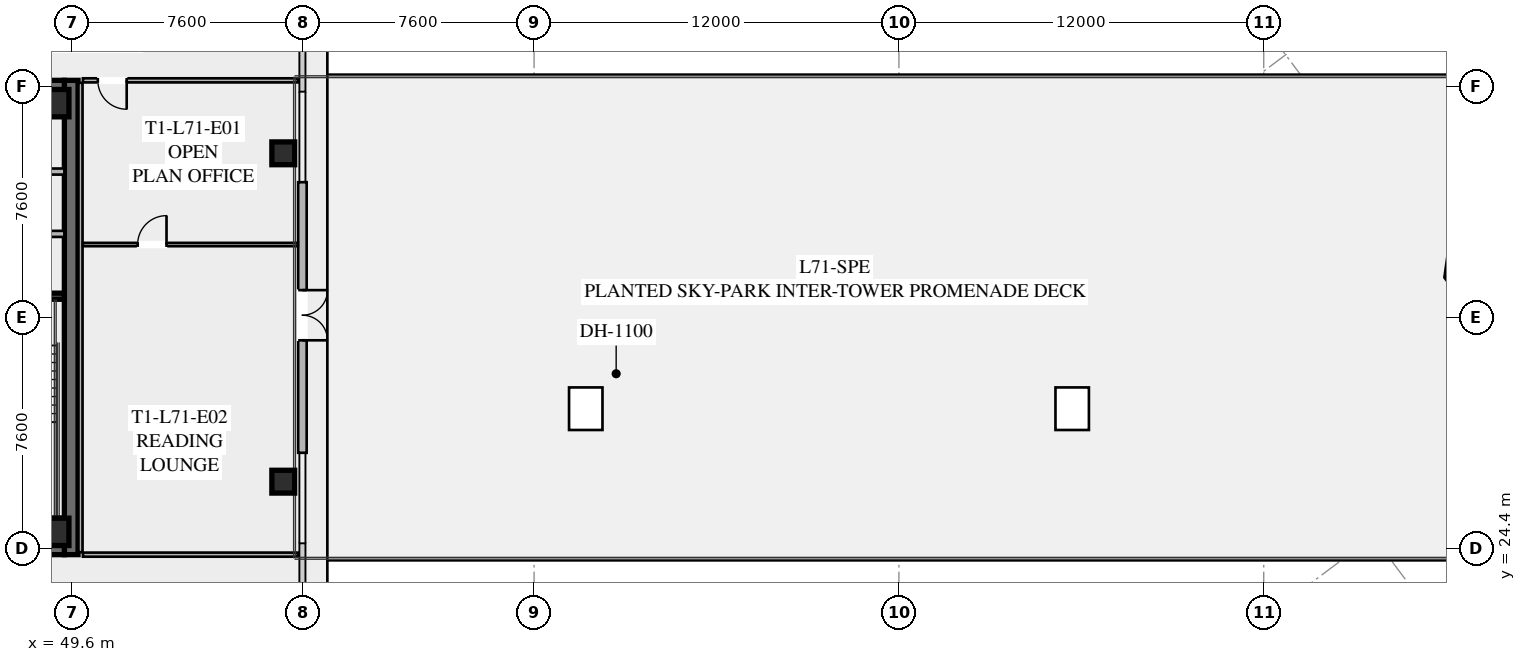
"""IFC4 building model, lengths in metres.
Left out: names, types, materials, properties, quantities, classifications, styles, units other than length and angle.
Written with IfcOpenShell. Run it as: python <this file> out.ifc"""

import sys

from ifc_helpers import new_model, si_unit, direction, frame, frame_2d, origin, origin_2d, place, context, subcontext, project, spatial, rectangle, hollow_rectangle, extrude, element, fill, save


model = new_model("IFC4")
c1 = context("Model", 3, precision=1e-05, world=origin(), true_north=direction((0.0, 1.0)))
c2 = subcontext(c1, "Body", "Model", "MODEL_VIEW")
j1 = project(units=[si_unit("LENGTHUNIT", "METRE"), si_unit("PLANEANGLEUNIT", "RADIAN")], contexts=[c1])
p1 = place(None, origin())
s1 = spatial("IfcSite", under=j1, at=p1, CompositionType="ELEMENT")
p2 = place(p1, origin())
s2 = spatial("IfcBuilding", under=s1, at=p2, CompositionType="ELEMENT")
p3 = place(p2, frame((0.0, 0.0, 263.4)))
s3 = spatial("IfcBuildingStorey", under=s2, at=p3, CompositionType="ELEMENT", Elevation=263.4)
p4 = place(p3, frame((49.575, 39.8, 0.0), z_axis=(0.0, 0.0, 1.0), x_axis=(0.0, -1.0, 0.0)))
e1 = element("IfcWall", 1, at=p4, inside=s3, PredefinedType="SHEAR", context=c2, shape_type="SweptSolid", body=[
    extrude(rectangle(XDim=15.6, YDim=0.45, at=frame_2d((7.8, 0.0))), origin(), (0.0, 0.0, 1.0), 3.55),
])
p5 = place(p3, frame((49.35, 24.425, 0.0), z_axis=(0.0, 0.0, 1.0), x_axis=(-1.0, 0.0, 0.0)))
e2 = element("IfcWall", 2, at=p5, inside=s3, PredefinedType="SHEAR", context=c2, shape_type="SweptSolid", body=[
    extrude(rectangle(XDim=14.7, YDim=0.45, at=frame_2d((7.35, 0.0))), origin(), (0.0, 0.0, 1.0), 3.55),
])
p6 = place(p5, frame((9.05, 0.0, 0.0)))
e3 = element("IfcOpeningElement", 3, at=p6, cuts=e2, PredefinedType="OPENING", context=c2, shape_type="SweptSolid", body=[
    extrude(rectangle(XDim=1.25, YDim=2.25, at=frame_2d((0.625, 1.125))), frame((0.0, 0.235, 0.0), z_axis=(0.0, -1.0, 0.0), x_axis=(1.0, 0.0, 0.0)), (0.0, 0.0, 1.0), 0.47),
])
p7 = place(p5, frame((4.0, 0.0, 0.0)))
e4 = element("IfcOpeningElement", 4, at=p7, cuts=e2, PredefinedType="OPENING", context=c2, shape_type="SweptSolid", body=[
    extrude(rectangle(XDim=1.25, YDim=2.25, at=frame_2d((0.625, 1.125))), frame((0.0, 0.235, 0.0), z_axis=(0.0, -1.0, 0.0), x_axis=(1.0, 0.0, 0.0)), (0.0, 0.0, 1.0), 0.47),
])
p8 = place(p3, frame((34.65, 39.575, 0.0), z_axis=(0.0, 0.0, 1.0), x_axis=(1.0, 0.0, 0.0)))
e5 = element("IfcWall", 5, at=p8, inside=s3, PredefinedType="SHEAR", context=c2, shape_type="SweptSolid", body=[
    extrude(rectangle(XDim=14.7, YDim=0.45, at=frame_2d((7.35, 0.0))), origin(), (0.0, 0.0, 1.0), 3.55),
])
p9 = place(p8, frame((4.4, 0.0, 0.0)))
e6 = element("IfcOpeningElement", 6, at=p9, cuts=e5, PredefinedType="OPENING", context=c2, shape_type="SweptSolid", body=[
    extrude(rectangle(XDim=1.25, YDim=2.25, at=frame_2d((0.625, 1.125))), frame((0.0, 0.235, 0.0), z_axis=(0.0, -1.0, 0.0), x_axis=(1.0, 0.0, 0.0)), (0.0, 0.0, 1.0), 0.47),
])
p10 = place(p8, frame((9.45, 0.0, 0.0)))
e7 = element("IfcOpeningElement", 7, at=p10, cuts=e5, PredefinedType="OPENING", context=c2, shape_type="SweptSolid", body=[
    extrude(rectangle(XDim=1.25, YDim=2.25, at=frame_2d((0.625, 1.125))), frame((0.0, 0.235, 0.0), z_axis=(0.0, -1.0, 0.0), x_axis=(1.0, 0.0, 0.0)), (0.0, 0.0, 1.0), 0.47),
])
for number, where, z_axis, x_axis in (
    (8, (49.05, 24.95, 0.0), (0.0, 0.0, 1.0), (1.0, 0.0, 0.0)),
    (9, (49.05, 39.05, 0.0), (0.0, 0.0, 1.0), (1.0, 0.0, 0.0)),
):
    element("IfcColumn", number, at=place(p3, frame(where, z_axis=z_axis, x_axis=x_axis)), inside=s3, PredefinedType="COLUMN", context=c2, shape_type="SweptSolid", body=[
        extrude(hollow_rectangle(XDim=0.9, YDim=0.9, WallThickness=0.04, at=origin_2d()), origin(), (0.0, 0.0, 1.0), 3.37),
    ])
for number, where, z_axis, x_axis in (
    (10, (56.55, 26.6, -0.295), (0.0, 0.0, 1.0), (1.0, 0.0, 0.0)),
    (11, (56.55, 37.4, -0.295), (0.0, 0.0, 1.0), (1.0, 0.0, 0.0)),
):
    element("IfcColumn", number, at=place(p3, frame(where, z_axis=z_axis, x_axis=x_axis)), inside=s3, PredefinedType="COLUMN", context=c2, shape_type="SweptSolid", body=[
        extrude(hollow_rectangle(XDim=0.75, YDim=0.75, WallThickness=0.032, at=origin_2d()), origin(), (0.0, 0.0, 1.0), 3.665),
    ])
p11 = place(p3, frame((57.18, 36.45, 0.0), z_axis=(0.0, 0.0, 1.0), x_axis=(0.0, -1.0, 0.0)))
e12 = element("IfcWall", 12, at=p11, inside=s3, PredefinedType="SOLIDWALL", context=c2, shape_type="SweptSolid", body=[
    extrude(rectangle(XDim=8.9, YDim=0.28, at=frame_2d((4.45, 0.0))), origin(), (0.0, 0.0, 1.0), 3.37),
])
p12 = place(p11, frame((3.55, 0.0, 0.0)))
e13 = element("IfcOpeningElement", 13, at=p12, cuts=e12, PredefinedType="OPENING", context=c2, shape_type="SweptSolid", body=[
    extrude(rectangle(XDim=1.65, YDim=2.2, at=frame_2d((0.825, 1.1))), frame((0.0, 0.15, 0.0), z_axis=(0.0, -1.0, 0.0), x_axis=(1.0, 0.0, 0.0)), (0.0, 0.0, 1.0), 0.3),
])
for number, where, z_axis, x_axis in (
    (14, (45.7, 32.7, 0.0), (0.0, 0.0, 1.0), (1.0, 0.0, 0.0)),
    (15, (45.7, 25.3, 0.0), (0.0, 0.0, 1.0), (1.0, 0.0, 0.0)),
):
    element("IfcWall", number, at=place(p3, frame(where, z_axis=z_axis, x_axis=x_axis)), inside=s3, PredefinedType="SHEAR", context=c2, shape_type="SweptSolid", body=[
        extrude(rectangle(XDim=3.65, YDim=0.2, at=frame_2d((1.825, 0.0))), origin(), (0.0, 0.0, 1.0), 3.37),
    ])
for number, where, z_axis, x_axis in (
    (16, (46.05, 34.75, 0.0), (0.0, 0.0, 1.0), (1.0, 0.0, 0.0)),
    (17, (46.05, 36.8, 0.0), (0.0, 0.0, 1.0), (1.0, 0.0, 0.0)),
):
    element("IfcWall", number, at=place(p3, frame(where, z_axis=z_axis, x_axis=x_axis)), inside=s3, PredefinedType="SOLIDWALL", context=c2, shape_type="SweptSolid", body=[
        extrude(rectangle(XDim=3.3, YDim=0.2, at=frame_2d((1.65, 0.0))), origin(), (0.0, 0.0, 1.0), 3.37),
    ])
p13 = place(p3, frame((49.88, 39.72, 0.0), z_axis=(0.0, 0.0, 1.0), x_axis=(0.0, -1.0, 0.0)))
e18 = element("IfcWall", 18, at=p13, inside=s3, PredefinedType="PARTITIONING", context=c2, shape_type="SweptSolid", body=[
    extrude(rectangle(XDim=15.44, YDim=0.135, at=frame_2d((7.72, 0.0))), origin(), (0.0, 0.0, 1.0), 2.723),
])
p14 = place(p3, frame((57.03, 39.8, 0.0), z_axis=(0.0, 0.0, 1.0), x_axis=(-1.0, 0.0, 0.0)))
e19 = element("IfcWall", 19, at=p14, inside=s3, PredefinedType="PARTITIONING", context=c2, shape_type="SweptSolid", body=[
    extrude(rectangle(XDim=7.07, YDim=0.135, at=frame_2d((3.535, 0.0))), origin(), (0.0, 0.0, 1.0), 2.723),
])
p15 = place(p14, frame((5.63, 0.0, 0.0)))
e20 = element("IfcOpeningElement", 20, at=p15, cuts=e19, PredefinedType="OPENING", context=c2, shape_type="SweptSolid", body=[
    extrude(rectangle(XDim=0.95, YDim=2.05, at=frame_2d((0.475, 1.025))), frame((0.0, 0.077, 0.0), z_axis=(0.0, -1.0, 0.0), x_axis=(1.0, 0.0, 0.0)), (0.0, 0.0, 1.0), 0.155),
])
p16 = place(p3, frame((49.96, 24.2, 0.0), z_axis=(0.0, 0.0, 1.0), x_axis=(1.0, 0.0, 0.0)))
e21 = element("IfcWall", 21, at=p16, inside=s3, PredefinedType="PARTITIONING", context=c2, shape_type="SweptSolid", body=[
    extrude(rectangle(XDim=7.07, YDim=0.135, at=frame_2d((3.535, 0.0))), origin(), (0.0, 0.0, 1.0), 2.723),
])
p17 = place(p3, frame((49.96, 34.4, 0.0), z_axis=(0.0, 0.0, 1.0), x_axis=(1.0, 0.0, 0.0)))
e22 = element("IfcWall", 22, at=p17, inside=s3, PredefinedType="PARTITIONING", context=c2, shape_type="SweptSolid", body=[
    extrude(rectangle(XDim=7.07, YDim=0.11, at=frame_2d((3.535, 0.0))), origin(), (0.0, 0.0, 1.0), 2.723),
])
p18 = place(p17, frame((1.8, 0.0, 0.0)))
e23 = element("IfcOpeningElement", 23, at=p18, cuts=e22, PredefinedType="OPENING", context=c2, shape_type="SweptSolid", body=[
    extrude(rectangle(XDim=0.95, YDim=2.05, at=frame_2d((0.475, 1.025))), frame((0.0, 0.065, 0.0), z_axis=(0.0, -1.0, 0.0), x_axis=(1.0, 0.0, 0.0)), (0.0, 0.0, 1.0), 0.13),
])
p19 = place(p12, origin())
e24 = element("IfcDoor", 24, at=p19, inside=s3, OperationType="DOUBLE_DOOR_SINGLE_SWING", PredefinedType="DOOR", context=c2, shape_type="SweptSolid", body=[
    extrude(rectangle(XDim=1.65, YDim=2.2, at=frame_2d((0.825, 1.1))), frame((0.0, 0.025, 0.0), z_axis=(0.0, -1.0, 0.0), x_axis=(1.0, 0.0, 0.0)), (0.0, 0.0, 1.0), 0.05),
])
fill(e13, e24)
p20 = place(p3, frame((0.0, 0.0, -0.3)))
p21 = place(p20, frame((66.5, 29.0, 0.0)))
p22 = place(p21, frame((0.0, 0.0, 0.25)))
e25 = element("IfcDoor", 25, at=p22, inside=s3, OperationType="SINGLE_SWING_LEFT", PredefinedType="TRAPDOOR", context=c2, shape_type="SweptSolid", body=[
    extrude(rectangle(XDim=1.1, YDim=1.4, at=origin_2d()), origin(), (0.0, 0.0, 1.0), 0.05),
])
p23 = place(p20, frame((82.5, 29.0, 0.0)))
p24 = place(p23, frame((0.0, 0.0, 0.25)))
e26 = element("IfcDoor", 26, at=p24, inside=s3, OperationType="SINGLE_SWING_LEFT", PredefinedType="TRAPDOOR", context=c2, shape_type="SweptSolid", body=[
    extrude(rectangle(XDim=1.1, YDim=1.4, at=origin_2d()), origin(), (0.0, 0.0, 1.0), 0.05),
])
p25 = place(p15, origin())
e27 = element("IfcDoor", 27, at=p25, inside=s3, OperationType="SINGLE_SWING_LEFT", PredefinedType="DOOR", context=c2, shape_type="SweptSolid", body=[
    extrude(rectangle(XDim=0.95, YDim=2.05, at=frame_2d((0.475, 1.025))), frame((0.0, 0.025, 0.0), z_axis=(0.0, -1.0, 0.0), x_axis=(1.0, 0.0, 0.0)), (0.0, 0.0, 1.0), 0.05),
])
fill(e20, e27)
p26 = place(p18, origin())
e28 = element("IfcDoor", 28, at=p26, inside=s3, OperationType="SINGLE_SWING_RIGHT", PredefinedType="DOOR", context=c2, shape_type="SweptSolid", body=[
    extrude(rectangle(XDim=0.95, YDim=2.05, at=frame_2d((0.475, 1.025))), frame((0.0, 0.025, 0.0), z_axis=(0.0, -1.0, 0.0), x_axis=(1.0, 0.0, 0.0)), (0.0, 0.0, 1.0), 0.05),
])
fill(e23, e28)
save(model, sys.argv[1])
